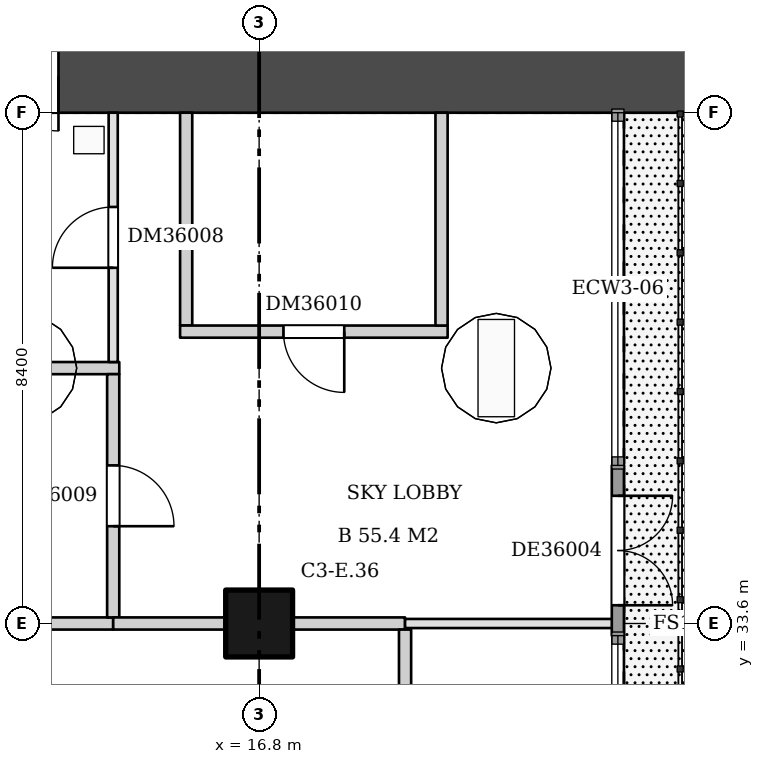
"""IFC4 building model, lengths in metres.
Left out: names, types, materials, properties, quantities, classifications, styles, units other than length and angle.
Written with IfcOpenShell. Run it as: python <this file> out.ifc"""

import sys

from ifc_helpers import new_model, si_unit, direction, frame, frame_2d, origin, origin_2d, place, context, subcontext, project, spatial, rectangle, extrude, element, fill, save


model = new_model("IFC4")
c1 = context("Model", 3, precision=1e-05, world=origin(), true_north=direction((0.0, 1.0)))
c2 = subcontext(c1, "Body", "Model", "MODEL_VIEW")
j1 = project(units=[si_unit("LENGTHUNIT", "METRE"), si_unit("PLANEANGLEUNIT", "RADIAN")], contexts=[c1])
p1 = place(None, origin())
s1 = spatial("IfcSite", under=j1, at=p1, CompositionType="ELEMENT")
p2 = place(p1, origin())
s2 = spatial("IfcBuilding", under=s1, at=p2, CompositionType="ELEMENT")
p3 = place(p2, frame((0.0, 0.0, 140.7)))
s3 = spatial("IfcBuildingStorey", under=s2, at=p3, CompositionType="ELEMENT", Elevation=140.7)
p4 = place(p3, frame((16.8, 33.6, 0.0), z_axis=(0.0, 0.0, 1.0), x_axis=(1.0, 0.0, 0.0)))
e1 = element("IfcColumn", 1, at=p4, inside=s3, PredefinedType="COLUMN", context=c2, shape_type="SweptSolid", body=[
    extrude(rectangle(XDim=1.1, YDim=1.1, at=origin_2d()), origin(), (0.0, 0.0, 1.0), 6.72),
])
p5 = place(p3, frame((9.6, 42.6, 0.0), z_axis=(0.0, 0.0, 1.0), x_axis=(1.0, 0.0, 0.0)))
e2 = element("IfcWall", 2, at=p5, inside=s3, PredefinedType="SHEAR", context=c2, shape_type="SweptSolid", body=[
    extrude(rectangle(XDim=14.4, YDim=1.2, at=frame_2d((7.2, 0.0))), origin(), (0.0, 0.0, 1.0), 6.72),
])
p6 = place(p5, frame((2.1, 0.0, 0.0)))
e3 = element("IfcOpeningElement", 3, at=p6, cuts=e2, PredefinedType="OPENING", context=c2, shape_type="SweptSolid", body=[
    extrude(rectangle(XDim=1.8, YDim=2.1, at=frame_2d((0.9, 1.05))), frame((0.0, 0.61, 0.0), z_axis=(0.0, -1.0, 0.0), x_axis=(1.0, 0.0, 0.0)), (0.0, 0.0, 1.0), 1.22),
])
p7 = place(p3, frame((10.9, 33.6, 0.0), z_axis=(0.0, 0.0, 1.0), x_axis=(1.0, 0.0, 0.0)))
e4 = element("IfcWall", 4, at=p7, inside=s3, PredefinedType="PARTITIONING", context=c2, shape_type="SweptSolid", body=[
    extrude(rectangle(XDim=3.5, YDim=0.2, at=frame_2d((1.75, 0.0))), origin(), (0.0, 0.0, 1.0), 6.72),
])
p8 = place(p3, frame((10.9, 37.8, 0.0), z_axis=(0.0, 0.0, 1.0), x_axis=(1.0, 0.0, 0.0)))
e5 = element("IfcWall", 5, at=p8, inside=s3, PredefinedType="PARTITIONING", context=c2, shape_type="SweptSolid", body=[
    extrude(rectangle(XDim=3.6, YDim=0.2, at=frame_2d((1.8, 0.0))), origin(), (0.0, 0.0, 1.0), 6.72),
])
p9 = place(p3, frame((14.4, 33.7, 0.0), z_axis=(0.0, 0.0, 1.0), x_axis=(0.0, 1.0, 0.0)))
e6 = element("IfcWall", 6, at=p9, inside=s3, PredefinedType="PARTITIONING", context=c2, shape_type="SweptSolid", body=[
    extrude(rectangle(XDim=4.0, YDim=0.2, at=frame_2d((2.0, 0.0))), origin(), (0.0, 0.0, 1.0), 6.72),
])
p10 = place(p9, frame((1.5, 0.0, 0.0)))
e7 = element("IfcOpeningElement", 7, at=p10, cuts=e6, PredefinedType="OPENING", context=c2, shape_type="SweptSolid", body=[
    extrude(rectangle(XDim=1.0, YDim=2.1, at=frame_2d((0.5, 1.05))), frame((0.0, 0.11, 0.0), z_axis=(0.0, -1.0, 0.0), x_axis=(1.0, 0.0, 0.0)), (0.0, 0.0, 1.0), 0.22),
])
p11 = place(p3, frame((14.4, 33.6, 0.0), z_axis=(0.0, 0.0, 1.0), x_axis=(1.0, 0.0, 0.0)))
e8 = element("IfcWall", 8, at=p11, inside=s3, PredefinedType="PARTITIONING", context=c2, shape_type="SweptSolid", body=[
    extrude(rectangle(XDim=1.85, YDim=0.2, at=frame_2d((0.925, 0.0))), origin(), (0.0, 0.0, 1.0), 6.72),
])
p12 = place(p3, frame((17.35, 33.6, 0.0), z_axis=(0.0, 0.0, 1.0), x_axis=(1.0, 0.0, 0.0)))
e9 = element("IfcWall", 9, at=p12, inside=s3, PredefinedType="PARTITIONING", context=c2, shape_type="SweptSolid", body=[
    extrude(rectangle(XDim=1.85, YDim=0.2, at=frame_2d((0.925, 0.0))), origin(), (0.0, 0.0, 1.0), 6.72),
])
p13 = place(p3, frame((14.4, 37.9, 0.0), z_axis=(0.0, 0.0, 1.0), x_axis=(0.0, 1.0, 0.0)))
e10 = element("IfcWall", 10, at=p13, inside=s3, PredefinedType="PARTITIONING", context=c2, shape_type="SweptSolid", body=[
    extrude(rectangle(XDim=4.1, YDim=0.15, at=frame_2d((2.05, 0.0))), origin(), (0.0, 0.0, 1.0), 6.72),
])
p14 = place(p13, frame((1.55, 0.0, 0.0)))
e11 = element("IfcOpeningElement", 11, at=p14, cuts=e10, PredefinedType="OPENING", context=c2, shape_type="SweptSolid", body=[
    extrude(rectangle(XDim=1.0, YDim=2.1, at=frame_2d((0.5, 1.05))), frame((0.0, 0.085, 0.0), z_axis=(0.0, -1.0, 0.0), x_axis=(1.0, 0.0, 0.0)), (0.0, 0.0, 1.0), 0.17),
])
p15 = place(p3, frame((15.6, 38.5, 0.0), z_axis=(0.0, 0.0, 1.0), x_axis=(0.0, 1.0, 0.0)))
e12 = element("IfcWall", 12, at=p15, inside=s3, PredefinedType="PARTITIONING", context=c2, shape_type="SweptSolid", body=[
    extrude(rectangle(XDim=3.5, YDim=0.2, at=frame_2d((1.75, 0.0))), origin(), (0.0, 0.0, 1.0), 6.72),
])
p16 = place(p3, frame((15.5, 38.4, 0.0), z_axis=(0.0, 0.0, 1.0), x_axis=(1.0, 0.0, 0.0)))
e13 = element("IfcWall", 13, at=p16, inside=s3, PredefinedType="PARTITIONING", context=c2, shape_type="SweptSolid", body=[
    extrude(rectangle(XDim=4.4, YDim=0.2, at=frame_2d((2.2, 0.0))), origin(), (0.0, 0.0, 1.0), 6.72),
])
p17 = place(p16, frame((1.7, 0.0, 0.0)))
e14 = element("IfcOpeningElement", 14, at=p17, cuts=e13, PredefinedType="OPENING", context=c2, shape_type="SweptSolid", body=[
    extrude(rectangle(XDim=1.0, YDim=2.1, at=frame_2d((0.5, 1.05))), frame((0.0, 0.11, 0.0), z_axis=(0.0, -1.0, 0.0), x_axis=(1.0, 0.0, 0.0)), (0.0, 0.0, 1.0), 0.22),
])
p18 = place(p3, frame((19.2, 29.5, 0.0), z_axis=(0.0, 0.0, 1.0), x_axis=(0.0, 1.0, 0.0)))
e15 = element("IfcWall", 15, at=p18, inside=s3, PredefinedType="PARTITIONING", context=c2, shape_type="SweptSolid", body=[
    extrude(rectangle(XDim=4.0, YDim=0.2, at=frame_2d((2.0, 0.0))), origin(), (0.0, 0.0, 1.0), 6.72),
])
p19 = place(p18, frame((1.0, 0.0, 0.0)))
e16 = element("IfcOpeningElement", 16, at=p19, cuts=e15, PredefinedType="OPENING", context=c2, shape_type="SweptSolid", body=[
    extrude(rectangle(XDim=2.0, YDim=2.1, at=frame_2d((1.0, 1.05))), frame((0.0, 0.11, 0.0), z_axis=(0.0, -1.0, 0.0), x_axis=(1.0, 0.0, 0.0)), (0.0, 0.0, 1.0), 0.22),
])
p20 = place(p3, frame((19.2, 33.6, 0.0), z_axis=(0.0, 0.0, 1.0), x_axis=(1.0, 0.0, 0.0)))
e17 = element("IfcWall", 17, at=p20, inside=s3, PredefinedType="PARTITIONING", context=c2, shape_type="SweptSolid", body=[
    extrude(rectangle(XDim=3.5, YDim=0.15, at=frame_2d((1.75, 0.0))), origin(), (0.0, 0.0, 1.0), 6.72),
])
p21 = place(p3, frame((19.8, 38.5, 0.0), z_axis=(0.0, 0.0, 1.0), x_axis=(0.0, 1.0, 0.0)))
e18 = element("IfcWall", 18, at=p21, inside=s3, PredefinedType="PARTITIONING", context=c2, shape_type="SweptSolid", body=[
    extrude(rectangle(XDim=3.5, YDim=0.2, at=frame_2d((1.75, 0.0))), origin(), (0.0, 0.0, 1.0), 6.72),
])
p22 = place(p3, frame((22.7, 33.4, 0.0), z_axis=(0.0, 0.0, 1.0), x_axis=(0.0, 1.0, 0.0)))
e19 = element("IfcWall", 19, at=p22, inside=s3, PredefinedType="SOLIDWALL", context=c2, shape_type="SweptSolid", body=[
    extrude(rectangle(XDim=2.8, YDim=0.2, at=frame_2d((1.4, 0.0))), origin(), (0.0, 0.0, 1.0), 6.72),
])
p23 = place(p22, frame((0.5, 0.0, 0.0)))
e20 = element("IfcOpeningElement", 20, at=p23, cuts=e19, PredefinedType="OPENING", context=c2, shape_type="SweptSolid", body=[
    extrude(rectangle(XDim=1.8, YDim=2.4, at=frame_2d((0.9, 1.2))), frame((0.0, 0.11, 0.0), z_axis=(0.0, -1.0, 0.0), x_axis=(1.0, 0.0, 0.0)), (0.0, 0.0, 1.0), 0.22),
])
p24 = place(p6, frame((1.8, 0.0, 0.0), z_axis=(0.0, 0.0, 1.0), x_axis=(-1.0, 0.0, 0.0)))
e21 = element("IfcDoor", 21, at=p24, inside=s3, OperationType="DOUBLE_DOOR_SINGLE_SWING", PredefinedType="DOOR", context=c2, shape_type="SweptSolid", body=[
    extrude(rectangle(XDim=1.8, YDim=2.1, at=frame_2d((0.9, 1.05))), frame((0.0, 0.025, 0.0), z_axis=(0.0, -1.0, 0.0), x_axis=(1.0, 0.0, 0.0)), (0.0, 0.0, 1.0), 0.05),
])
fill(e3, e21)
p25 = place(p14, origin())
e22 = element("IfcDoor", 22, at=p25, inside=s3, OperationType="SINGLE_SWING_LEFT", PredefinedType="DOOR", context=c2, shape_type="SweptSolid", body=[
    extrude(rectangle(XDim=1.0, YDim=2.1, at=frame_2d((0.5, 1.05))), frame((0.0, 0.025, 0.0), z_axis=(0.0, -1.0, 0.0), x_axis=(1.0, 0.0, 0.0)), (0.0, 0.0, 1.0), 0.05),
])
fill(e11, e22)
p26 = place(p10, frame((1.0, 0.0, 0.0), z_axis=(0.0, 0.0, 1.0), x_axis=(-1.0, 0.0, 0.0)))
e23 = element("IfcDoor", 23, at=p26, inside=s3, OperationType="SINGLE_SWING_RIGHT", PredefinedType="DOOR", context=c2, shape_type="SweptSolid", body=[
    extrude(rectangle(XDim=1.0, YDim=2.1, at=frame_2d((0.5, 1.05))), frame((0.0, 0.025, 0.0), z_axis=(0.0, -1.0, 0.0), x_axis=(1.0, 0.0, 0.0)), (0.0, 0.0, 1.0), 0.05),
])
fill(e7, e23)
p27 = place(p17, frame((1.0, 0.0, 0.0), z_axis=(0.0, 0.0, 1.0), x_axis=(-1.0, 0.0, 0.0)))
e24 = element("IfcDoor", 24, at=p27, inside=s3, OperationType="SINGLE_SWING_LEFT", PredefinedType="DOOR", context=c2, shape_type="SweptSolid", body=[
    extrude(rectangle(XDim=1.0, YDim=2.1, at=frame_2d((0.5, 1.05))), frame((0.0, 0.025, 0.0), z_axis=(0.0, -1.0, 0.0), x_axis=(1.0, 0.0, 0.0)), (0.0, 0.0, 1.0), 0.05),
])
fill(e14, e24)
p28 = place(p23, frame((1.8, 0.0, 0.0), z_axis=(0.0, 0.0, 1.0), x_axis=(-1.0, 0.0, 0.0)))
e25 = element("IfcDoor", 25, at=p28, inside=s3, OperationType="DOUBLE_DOOR_SINGLE_SWING", PredefinedType="DOOR", context=c2, shape_type="SweptSolid", body=[
    extrude(rectangle(XDim=1.8, YDim=2.4, at=frame_2d((0.9, 1.2))), frame((0.0, 0.025, 0.0), z_axis=(0.0, -1.0, 0.0), x_axis=(1.0, 0.0, 0.0)), (0.0, 0.0, 1.0), 0.05),
])
fill(e20, e25)
save(model, sys.argv[1])
